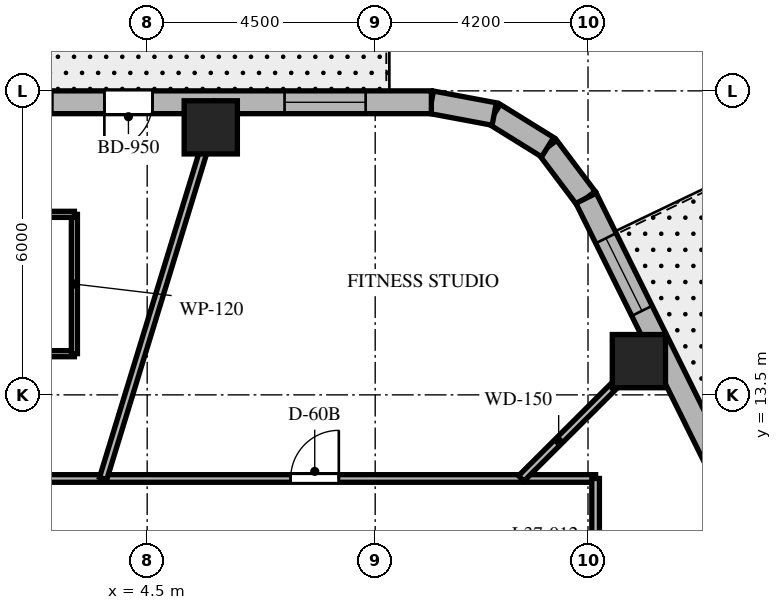
"""IFC4 building model, lengths in metres.
Left out: names, types, materials, properties, quantities, classifications, styles, units other than length and angle.
Written with IfcOpenShell. Run it as: python <this file> out.ifc"""

import sys

from ifc_helpers import new_model, si_unit, direction, frame, frame_2d, origin, origin_2d, place, context, subcontext, project, spatial, rectangle, extrude, element, fill, save


model = new_model("IFC4")
c1 = context("Model", 3, precision=1e-05, world=origin(), true_north=direction((0.0, 1.0)))
c2 = subcontext(c1, "Body", "Model", "MODEL_VIEW")
j1 = project(units=[si_unit("LENGTHUNIT", "METRE"), si_unit("PLANEANGLEUNIT", "RADIAN")], contexts=[c1])
p1 = place(None, origin())
s1 = spatial("IfcSite", under=j1, at=p1, CompositionType="ELEMENT")
p2 = place(p1, origin())
s2 = spatial("IfcBuilding", under=s1, at=p2, CompositionType="ELEMENT")
p3 = place(p2, frame((0.0, 0.0, 151.7)))
s3 = spatial("IfcBuildingStorey", under=s2, at=p3, CompositionType="ELEMENT", Elevation=151.7)
for number, where, z_axis, x_axis in (
    (1, (14.204, 14.166, 0.0), (0.0, 0.0, 1.0), (1.0, 0.0, 0.0)),
    (2, (5.755, 18.78, 0.0), (0.0, 0.0, 1.0), (1.0, 0.0, 0.0)),
):
    element("IfcColumn", number, at=place(p3, frame(where, z_axis=z_axis, x_axis=x_axis)), inside=s3, PredefinedType="COLUMN", context=c2, shape_type="SweptSolid", body=[
        extrude(rectangle(XDim=1.05, YDim=1.05, at=origin_2d()), origin(), (0.0, 0.0, 1.0), 3.7),
    ])
p4 = place(p3, frame((13.162, 17.381, 0.0), z_axis=(0.0, 0.0, 1.0), x_axis=(-0.601515770517, 0.798860925205, 0.0)))
e3 = element("IfcWall", 3, at=p4, inside=s3, PredefinedType="SOLIDWALL", context=c2, shape_type="SweptSolid", body=[
    extrude(rectangle(XDim=1.262, YDim=0.45, at=frame_2d((0.631, 0.0))), origin(), (0.0, 0.0, 1.0), 3.4),
])
p5 = place(p3, frame((12.403, 18.389, 0.0), z_axis=(0.0, 0.0, 1.0), x_axis=(-0.849795170926, 0.527113049991, 0.0)))
e4 = element("IfcWall", 4, at=p5, inside=s3, PredefinedType="SOLIDWALL", context=c2, shape_type="SweptSolid", body=[
    extrude(rectangle(XDim=1.241, YDim=0.45, at=frame_2d((0.62, 0.0))), origin(), (0.0, 0.0, 1.0), 3.4),
])
p6 = place(p3, frame((11.349, 19.043, 0.0), z_axis=(0.0, 0.0, 1.0), x_axis=(-0.982931267051, 0.183973161772, 0.0)))
e5 = element("IfcWall", 5, at=p6, inside=s3, PredefinedType="SOLIDWALL", context=c2, shape_type="SweptSolid", body=[
    extrude(rectangle(XDim=1.262, YDim=0.45, at=frame_2d((0.631, 0.0))), origin(), (0.0, 0.0, 1.0), 3.4),
])
p7 = place(p3, frame((20.618, 2.344, 0.0), z_axis=(0.0, 0.0, 1.0), x_axis=(-0.444243691097, 0.895905990002, 0.0)))
e6 = element("IfcWall", 6, at=p7, inside=s3, PredefinedType="SOLIDWALL", context=c2, shape_type="SweptSolid", body=[
    extrude(rectangle(XDim=16.784, YDim=0.45, at=frame_2d((8.392, 0.0))), origin(), (0.0, 0.0, 1.0), 3.4),
])
p8 = place(p7, frame((4.535, 0.0, 0.0)))
e7 = element("IfcOpeningElement", 7, at=p8, cuts=e6, PredefinedType="OPENING", context=c2, shape_type="SweptSolid", body=[
    extrude(rectangle(XDim=1.0, YDim=2.15, at=frame_2d((0.5, 1.075))), frame((0.0, 0.235, 0.0), z_axis=(0.0, -1.0, 0.0), x_axis=(1.0, 0.0, 0.0)), (0.0, 0.0, 1.0), 0.47),
])
p9 = place(p7, frame((7.642, 0.0, 0.8)))
e8 = element("IfcOpeningElement", 8, at=p9, cuts=e6, PredefinedType="OPENING", context=c2, shape_type="SweptSolid", body=[
    extrude(rectangle(XDim=1.6, YDim=1.75, at=frame_2d((0.8, 0.875))), frame((0.0, 0.235, 0.0), z_axis=(0.0, -1.0, 0.0), x_axis=(1.0, 0.0, 0.0)), (0.0, 0.0, 1.0), 0.47),
])
p10 = place(p7, frame((14.303, 0.0, 0.8)))
e9 = element("IfcOpeningElement", 9, at=p10, cuts=e6, PredefinedType="OPENING", context=c2, shape_type="SweptSolid", body=[
    extrude(rectangle(XDim=1.6, YDim=1.75, at=frame_2d((0.8, 0.875))), frame((0.0, 0.235, 0.0), z_axis=(0.0, -1.0, 0.0), x_axis=(1.0, 0.0, 0.0)), (0.0, 0.0, 1.0), 0.47),
])
p11 = place(p7, frame((0.931, 0.0, 0.8)))
e10 = element("IfcOpeningElement", 10, at=p11, cuts=e6, PredefinedType="OPENING", context=c2, shape_type="SweptSolid", body=[
    extrude(rectangle(XDim=1.6, YDim=1.75, at=frame_2d((0.8, 0.875))), frame((0.0, 0.235, 0.0), z_axis=(0.0, -1.0, 0.0), x_axis=(1.0, 0.0, 0.0)), (0.0, 0.0, 1.0), 0.47),
])
p12 = place(p3, frame((10.108, 19.275, 0.0), z_axis=(0.0, 0.0, 1.0), x_axis=(-1.0, 0.0, 0.0)))
e11 = element("IfcWall", 11, at=p12, inside=s3, PredefinedType="SOLIDWALL", context=c2, shape_type="SweptSolid", body=[
    extrude(rectangle(XDim=21.829, YDim=0.45, at=frame_2d((10.915, 0.0))), origin(), (0.0, 0.0, 1.0), 3.4),
])
p13 = place(p12, frame((5.503, 0.0, 0.0)))
e12 = element("IfcOpeningElement", 12, at=p13, cuts=e11, PredefinedType="OPENING", context=c2, shape_type="SweptSolid", body=[
    extrude(rectangle(XDim=0.95, YDim=2.15, at=frame_2d((0.475, 1.075))), frame((0.0, 0.235, 0.0), z_axis=(0.0, -1.0, 0.0), x_axis=(1.0, 0.0, 0.0)), (0.0, 0.0, 1.0), 0.47),
])
p14 = place(p12, frame((1.297, 0.0, 0.8)))
e13 = element("IfcOpeningElement", 13, at=p14, cuts=e11, PredefinedType="OPENING", context=c2, shape_type="SweptSolid", body=[
    extrude(rectangle(XDim=1.6, YDim=1.75, at=frame_2d((0.8, 0.875))), frame((0.0, 0.235, 0.0), z_axis=(0.0, -1.0, 0.0), x_axis=(1.0, 0.0, 0.0)), (0.0, 0.0, 1.0), 0.47),
])
p15 = place(p12, frame((7.479, 0.0, 0.8)))
e14 = element("IfcOpeningElement", 14, at=p15, cuts=e11, PredefinedType="OPENING", context=c2, shape_type="SweptSolid", body=[
    extrude(rectangle(XDim=1.6, YDim=1.75, at=frame_2d((0.8, 0.875))), frame((0.0, 0.235, 0.0), z_axis=(0.0, -1.0, 0.0), x_axis=(1.0, 0.0, 0.0)), (0.0, 0.0, 1.0), 0.47),
])
p16 = place(p12, frame((13.461, 0.0, 0.8)))
e15 = element("IfcOpeningElement", 15, at=p16, cuts=e11, PredefinedType="OPENING", context=c2, shape_type="SweptSolid", body=[
    extrude(rectangle(XDim=1.6, YDim=1.75, at=frame_2d((0.8, 0.875))), frame((0.0, 0.235, 0.0), z_axis=(0.0, -1.0, 0.0), x_axis=(1.0, 0.0, 0.0)), (0.0, 0.0, 1.0), 0.47),
])
p17 = place(p12, frame((18.933, 0.0, 0.8)))
e16 = element("IfcOpeningElement", 16, at=p17, cuts=e11, PredefinedType="OPENING", context=c2, shape_type="SweptSolid", body=[
    extrude(rectangle(XDim=1.6, YDim=1.75, at=frame_2d((0.8, 0.875))), frame((0.0, 0.235, 0.0), z_axis=(0.0, -1.0, 0.0), x_axis=(1.0, 0.0, 0.0)), (0.0, 0.0, 1.0), 0.47),
])
p18 = place(p3, frame((-13.35, 11.85, 0.0), z_axis=(0.0, 0.0, 1.0), x_axis=(1.0, 0.0, 0.0)))
e17 = element("IfcWall", 17, at=p18, inside=s3, PredefinedType="PARTITIONING", context=c2, shape_type="SweptSolid", body=[
    extrude(rectangle(XDim=26.7, YDim=0.15, at=frame_2d((13.35, 0.0))), origin(), (0.0, 0.0, 1.0), 2.84),
])
p19 = place(p18, frame((20.682, 0.0, 0.0)))
e18 = element("IfcOpeningElement", 18, at=p19, cuts=e17, PredefinedType="OPENING", context=c2, shape_type="SweptSolid", body=[
    extrude(rectangle(XDim=0.95, YDim=2.03, at=frame_2d((0.475, 1.015))), frame((0.0, 0.085, 0.0), z_axis=(0.0, -1.0, 0.0), x_axis=(1.0, 0.0, 0.0)), (0.0, 0.0, 1.0), 0.17),
])
p20 = place(p18, frame((14.229, 0.0, 0.0)))
e19 = element("IfcOpeningElement", 19, at=p20, cuts=e17, PredefinedType="OPENING", context=c2, shape_type="SweptSolid", body=[
    extrude(rectangle(XDim=0.95, YDim=2.03, at=frame_2d((0.475, 1.015))), frame((0.0, 0.085, 0.0), z_axis=(0.0, -1.0, 0.0), x_axis=(1.0, 0.0, 0.0)), (0.0, 0.0, 1.0), 0.17),
])
p21 = place(p18, frame((10.075, 0.0, 0.0)))
e20 = element("IfcOpeningElement", 20, at=p21, cuts=e17, PredefinedType="OPENING", context=c2, shape_type="SweptSolid", body=[
    extrude(rectangle(XDim=0.95, YDim=2.03, at=frame_2d((0.475, 1.015))), frame((0.0, 0.085, 0.0), z_axis=(0.0, -1.0, 0.0), x_axis=(1.0, 0.0, 0.0)), (0.0, 0.0, 1.0), 0.17),
])
p22 = place(p18, frame((3.995, 0.0, 0.0)))
e21 = element("IfcOpeningElement", 21, at=p22, cuts=e17, PredefinedType="OPENING", context=c2, shape_type="SweptSolid", body=[
    extrude(rectangle(XDim=0.95, YDim=2.03, at=frame_2d((0.475, 1.015))), frame((0.0, 0.085, 0.0), z_axis=(0.0, -1.0, 0.0), x_axis=(1.0, 0.0, 0.0)), (0.0, 0.0, 1.0), 0.17),
])
p23 = place(p3, frame((13.35, 11.85, 0.0), z_axis=(0.0, 0.0, 1.0), x_axis=(0.0, -1.0, 0.0)))
e22 = element("IfcWall", 22, at=p23, inside=s3, PredefinedType="PARTITIONING", context=c2, shape_type="SweptSolid", body=[
    extrude(rectangle(XDim=23.7, YDim=0.15, at=frame_2d((11.85, 0.0))), origin(), (0.0, 0.0, 1.0), 2.84),
])
p24 = place(p23, frame((3.765, 0.0, 0.0)))
e23 = element("IfcOpeningElement", 23, at=p24, cuts=e22, PredefinedType="OPENING", context=c2, shape_type="SweptSolid", body=[
    extrude(rectangle(XDim=0.9, YDim=2.03, at=frame_2d((0.45, 1.015))), frame((0.0, 0.085, 0.0), z_axis=(0.0, -1.0, 0.0), x_axis=(1.0, 0.0, 0.0)), (0.0, 0.0, 1.0), 0.17),
])
p25 = place(p23, frame((20.395, 0.0, 0.0)))
e24 = element("IfcOpeningElement", 24, at=p25, cuts=e22, PredefinedType="OPENING", context=c2, shape_type="SweptSolid", body=[
    extrude(rectangle(XDim=0.9, YDim=2.03, at=frame_2d((0.45, 1.015))), frame((0.0, 0.085, 0.0), z_axis=(0.0, -1.0, 0.0), x_axis=(1.0, 0.0, 0.0)), (0.0, 0.0, 1.0), 0.17),
])
p26 = place(p23, frame((15.787, 0.0, 0.0)))
e25 = element("IfcOpeningElement", 25, at=p26, cuts=e22, PredefinedType="OPENING", context=c2, shape_type="SweptSolid", body=[
    extrude(rectangle(XDim=0.95, YDim=2.03, at=frame_2d((0.475, 1.015))), frame((0.0, 0.085, 0.0), z_axis=(0.0, -1.0, 0.0), x_axis=(1.0, 0.0, 0.0)), (0.0, 0.0, 1.0), 0.17),
])
p27 = place(p23, frame((10.751, 0.0, 0.0)))
e26 = element("IfcOpeningElement", 26, at=p27, cuts=e22, PredefinedType="OPENING", context=c2, shape_type="SweptSolid", body=[
    extrude(rectangle(XDim=0.95, YDim=2.03, at=frame_2d((0.475, 1.015))), frame((0.0, 0.085, 0.0), z_axis=(0.0, -1.0, 0.0), x_axis=(1.0, 0.0, 0.0)), (0.0, 0.0, 1.0), 0.17),
])
p28 = place(p3, frame((11.882, 11.85, 0.0), z_axis=(0.0, 0.0, 1.0), x_axis=(0.708037373639, 0.706174962407, 0.0)))
e27 = element("IfcWall", 27, at=p28, inside=s3, PredefinedType="PARTITIONING", context=c2, shape_type="SweptSolid", body=[
    extrude(rectangle(XDim=3.802, YDim=0.15, at=frame_2d((1.901, 0.0))), origin(), (0.0, 0.0, 1.0), 2.64),
])
p29 = place(p3, frame((3.631, 11.85, 0.0), z_axis=(0.0, 0.0, 1.0), x_axis=(0.293007573338, 0.956110120209, 0.0)))
e28 = element("IfcWall", 28, at=p29, inside=s3, PredefinedType="PARTITIONING", context=c2, shape_type="SweptSolid", body=[
    extrude(rectangle(XDim=7.766, YDim=0.15, at=frame_2d((3.883, 0.0))), origin(), (0.0, 0.0, 1.0), 2.64),
])
p30 = place(p3, frame((0.464, 14.313, 0.0), z_axis=(0.0, 0.0, 1.0), x_axis=(1.0, 0.0, 0.0)))
e29 = element("IfcWall", 29, at=p30, inside=s3, PredefinedType="PARTITIONING", context=c2, shape_type="SweptSolid", body=[
    extrude(rectangle(XDim=2.6, YDim=0.12, at=frame_2d((1.3, 0.0))), origin(), (0.0, 0.0, 1.0), 3.4),
])
p31 = place(p30, frame((0.875, 0.0, 0.0)))
e30 = element("IfcOpeningElement", 30, at=p31, cuts=e29, PredefinedType="OPENING", context=c2, shape_type="SweptSolid", body=[
    extrude(rectangle(XDim=0.85, YDim=2.03, at=frame_2d((0.425, 1.015))), frame((0.0, 0.07, 0.0), z_axis=(0.0, -1.0, 0.0), x_axis=(1.0, 0.0, 0.0)), (0.0, 0.0, 1.0), 0.14),
])
p32 = place(p3, frame((3.064, 14.313, 0.0), z_axis=(0.0, 0.0, 1.0), x_axis=(0.0, 1.0, 0.0)))
e31 = element("IfcWall", 31, at=p32, inside=s3, PredefinedType="PARTITIONING", context=c2, shape_type="SweptSolid", body=[
    extrude(rectangle(XDim=2.75, YDim=0.12, at=frame_2d((1.375, 0.0))), origin(), (0.0, 0.0, 1.0), 2.84),
])
p33 = place(p3, frame((3.064, 17.063, 0.0), z_axis=(0.0, 0.0, 1.0), x_axis=(-1.0, 0.0, 0.0)))
e32 = element("IfcWall", 32, at=p33, inside=s3, PredefinedType="PARTITIONING", context=c2, shape_type="SweptSolid", body=[
    extrude(rectangle(XDim=2.6, YDim=0.12, at=frame_2d((1.3, 0.0))), origin(), (0.0, 0.0, 1.0), 3.4),
])
p34 = place(p10, origin())
e33 = element("IfcWindow", 33, at=p34, inside=s3, PartitioningType="SINGLE_PANEL", PredefinedType="WINDOW", context=c2, shape_type="SweptSolid", body=[
    extrude(rectangle(XDim=1.6, YDim=1.75, at=frame_2d((0.8, 0.875))), frame((0.0, 0.03, 0.0), z_axis=(0.0, -1.0, 0.0), x_axis=(1.0, 0.0, 0.0)), (0.0, 0.0, 1.0), 0.06),
])
fill(e9, e33)
p35 = place(p13, origin())
e34 = element("IfcDoor", 34, at=p35, inside=s3, OperationType="SINGLE_SWING_RIGHT", PredefinedType="DOOR", context=c2, shape_type="SweptSolid", body=[
    extrude(rectangle(XDim=0.95, YDim=2.15, at=frame_2d((0.475, 1.075))), frame((0.0, 0.025, 0.0), z_axis=(0.0, -1.0, 0.0), x_axis=(1.0, 0.0, 0.0)), (0.0, 0.0, 1.0), 0.05),
])
fill(e12, e34)
p36 = place(p14, origin())
e35 = element("IfcWindow", 35, at=p36, inside=s3, PartitioningType="SINGLE_PANEL", PredefinedType="WINDOW", context=c2, shape_type="SweptSolid", body=[
    extrude(rectangle(XDim=1.6, YDim=1.75, at=frame_2d((0.8, 0.875))), frame((0.0, 0.03, 0.0), z_axis=(0.0, -1.0, 0.0), x_axis=(1.0, 0.0, 0.0)), (0.0, 0.0, 1.0), 0.06),
])
fill(e13, e35)
p37 = place(p19, origin())
e36 = element("IfcDoor", 36, at=p37, inside=s3, OperationType="SINGLE_SWING_RIGHT", PredefinedType="DOOR", context=c2, shape_type="SweptSolid", body=[
    extrude(rectangle(XDim=0.95, YDim=2.03, at=frame_2d((0.475, 1.015))), frame((0.0, 0.025, 0.0), z_axis=(0.0, -1.0, 0.0), x_axis=(1.0, 0.0, 0.0)), (0.0, 0.0, 1.0), 0.05),
])
fill(e18, e36)
save(model, sys.argv[1])
